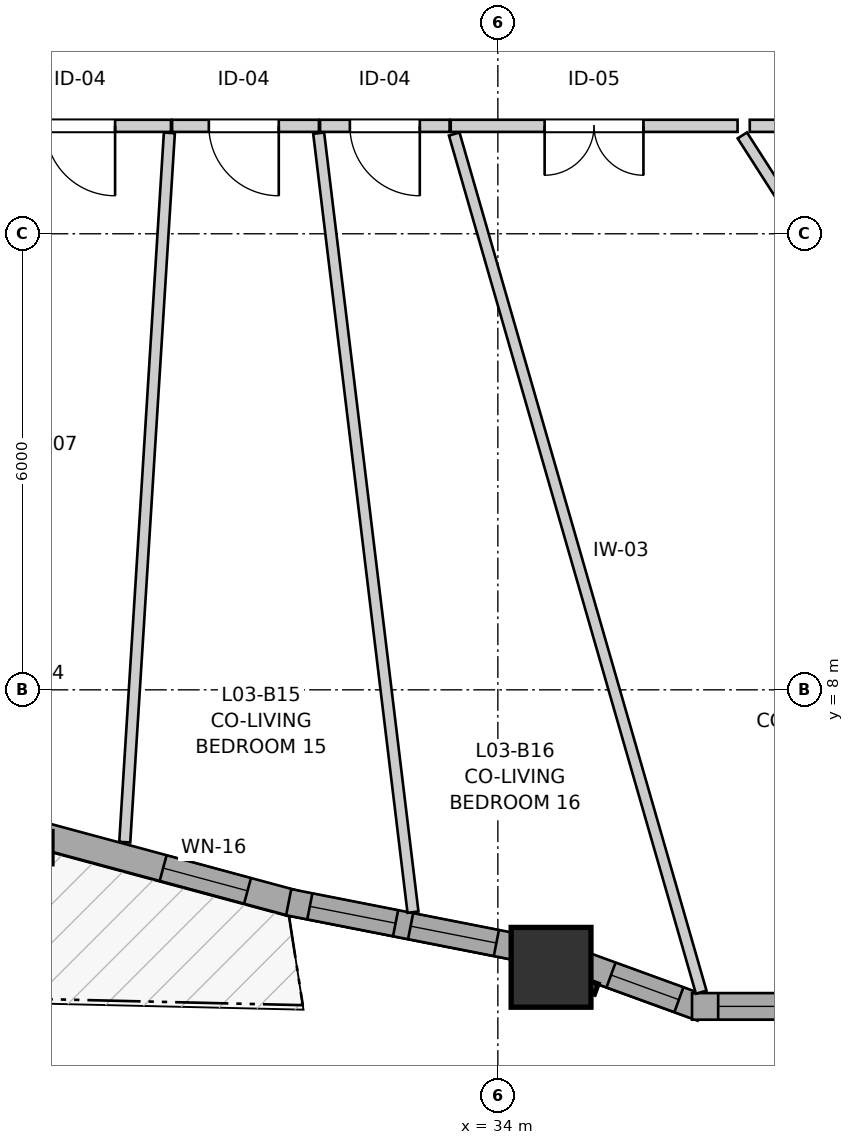
"""IFC4 building model, lengths in metres.
Left out: names, types, materials, properties, quantities, classifications, styles, units other than length and angle.
Written with IfcOpenShell. Run it as: python <this file> out.ifc"""

import sys

from ifc_helpers import new_model, si_unit, direction, frame, frame_2d, origin, origin_2d, place, context, subcontext, project, spatial, rectangle, i_section, extrude, source, transform, mapped, element, fill, save


model = new_model("IFC4")
c1 = context("Model", 3, precision=1e-05, world=origin(), true_north=direction((0.0, 1.0)))
c2 = subcontext(c1, "Body", "Model", "MODEL_VIEW")
j1 = project(units=[si_unit("LENGTHUNIT", "METRE"), si_unit("PLANEANGLEUNIT", "RADIAN")], contexts=[c1])
p1 = place(None, origin())
s1 = spatial("IfcSite", under=j1, at=p1, CompositionType="ELEMENT")
p2 = place(p1, origin())
s2 = spatial("IfcBuilding", under=s1, at=p2, CompositionType="ELEMENT")
p3 = place(p2, frame((0.0, 0.0, 14.2)))
s3 = spatial("IfcBuildingStorey", under=s2, at=p3, CompositionType="ELEMENT", Elevation=14.2)
m1 = source(origin(), c2, "Body", "SweptSolid", [
    extrude(i_section(OverallWidth=0.409, OverallDepth=0.425, WebThickness=0.03, FlangeThickness=0.048, FilletRadius=0.015, at=origin_2d()), origin(), (0.0, 0.0, 1.0), 2.94),
])
p4 = place(p3, frame((27.929, 5.924, 0.0), z_axis=(0.0, 0.0, 1.0), x_axis=(1.0, 0.0, 0.0)))
e1 = element("IfcColumn", 1, at=p4, inside=s3, PredefinedType="PILASTER", context=c2, shape_type="MappedRepresentation", body=[
    mapped(m1, transform((0.0, 0.0, 0.0), x_axis=(1.0, 0.0, 0.0), y_axis=(0.0, 1.0, 0.0), z_axis=(0.0, 0.0, 1.0), scale=1.0)),
])
m2 = source(origin(), c2, "Body", "SweptSolid", [
    extrude(rectangle(XDim=1.05, YDim=1.05, at=origin_2d()), origin(), (0.0, 0.0, 1.0), 2.94),
])
p5 = place(p3, frame((34.7, 4.349, 0.0), z_axis=(0.0, 0.0, 1.0), x_axis=(1.0, 0.0, 0.0)))
e2 = element("IfcColumn", 2, at=p5, inside=s3, PredefinedType="COLUMN", context=c2, shape_type="MappedRepresentation", body=[
    mapped(m2, transform((0.0, 0.0, 0.0), x_axis=(1.0, 0.0, 0.0), y_axis=(0.0, 1.0, 0.0), z_axis=(0.0, 0.0, 1.0), scale=1.0)),
])
p6 = place(p3, frame((27.994, 6.088, 0.0), z_axis=(0.0, 0.0, 1.0), x_axis=(0.965452701472, -0.260578359079, 0.0)))
e3 = element("IfcWall", 3, at=p6, inside=s3, PredefinedType="SOLIDWALL", context=c2, shape_type="SweptSolid", body=[
    extrude(rectangle(XDim=3.459, YDim=0.35, at=frame_2d((1.729, 0.0))), origin(), (0.0, 0.0, 1.0), 2.42),
])
p7 = place(p6, frame((1.66, 0.0, 0.82)))
e4 = element("IfcOpeningElement", 4, at=p7, cuts=e3, PredefinedType="OPENING", context=c2, shape_type="SweptSolid", body=[
    extrude(rectangle(XDim=1.15, YDim=1.2, at=frame_2d((0.575, 0.6))), frame((0.0, 0.185, 0.0), z_axis=(0.0, -1.0, 0.0), x_axis=(1.0, 0.0, 0.0)), (0.0, 0.0, 1.0), 0.37),
])
p8 = place(p3, frame((31.248, 5.206, 0.0), z_axis=(0.0, 0.0, 1.0), x_axis=(0.981233354077, -0.192824025597, 0.0)))
e5 = element("IfcWall", 5, at=p8, inside=s3, PredefinedType="SOLIDWALL", context=c2, shape_type="SweptSolid", body=[
    extrude(rectangle(XDim=3.253, YDim=0.35, at=frame_2d((1.626, 0.0))), origin(), (0.0, 0.0, 1.0), 2.42),
])
p9 = place(p8, frame((0.284, 0.0, 0.82)))
e6 = element("IfcOpeningElement", 6, at=p9, cuts=e5, PredefinedType="OPENING", context=c2, shape_type="SweptSolid", body=[
    extrude(rectangle(XDim=1.15, YDim=1.2, at=frame_2d((0.575, 0.6))), frame((0.0, 0.185, 0.0), z_axis=(0.0, -1.0, 0.0), x_axis=(1.0, 0.0, 0.0)), (0.0, 0.0, 1.0), 0.37),
])
p10 = place(p8, frame((1.635, 0.0, 0.82)))
e7 = element("IfcOpeningElement", 7, at=p10, cuts=e5, PredefinedType="OPENING", context=c2, shape_type="SweptSolid", body=[
    extrude(rectangle(XDim=1.15, YDim=1.2, at=frame_2d((0.575, 0.6))), frame((0.0, 0.185, 0.0), z_axis=(0.0, -1.0, 0.0), x_axis=(1.0, 0.0, 0.0)), (0.0, 0.0, 1.0), 0.37),
])
p11 = place(p3, frame((35.042, 4.411, 0.0), z_axis=(0.0, 0.0, 1.0), x_axis=(0.9396916908, -0.34202269843, 0.0)))
e8 = element("IfcWall", 8, at=p11, inside=s3, PredefinedType="SOLIDWALL", context=c2, shape_type="SweptSolid", body=[
    extrude(rectangle(XDim=1.752, YDim=0.35, at=frame_2d((0.876, 0.0))), origin(), (0.0, 0.0, 1.0), 2.42),
])
p12 = place(p11, frame((0.476, 0.0, 0.82)))
e9 = element("IfcOpeningElement", 9, at=p12, cuts=e8, PredefinedType="OPENING", context=c2, shape_type="SweptSolid", body=[
    extrude(rectangle(XDim=0.95, YDim=1.35, at=frame_2d((0.475, 0.675))), frame((0.0, 0.185, 0.0), z_axis=(0.0, -1.0, 0.0), x_axis=(1.0, 0.0, 0.0)), (0.0, 0.0, 1.0), 0.37),
])
p13 = place(p3, frame((36.555, 3.835, 0.0), z_axis=(0.0, 0.0, 1.0), x_axis=(1.0, 0.0, 0.0)))
e10 = element("IfcWall", 10, at=p13, inside=s3, PredefinedType="SOLIDWALL", context=c2, shape_type="SweptSolid", body=[
    extrude(rectangle(XDim=2.091, YDim=0.35, at=frame_2d((1.045, 0.0))), origin(), (0.0, 0.0, 1.0), 2.42),
])
p14 = place(p13, frame((0.344, 0.0, 0.82)))
e11 = element("IfcOpeningElement", 11, at=p14, cuts=e10, PredefinedType="OPENING", context=c2, shape_type="SweptSolid", body=[
    extrude(rectangle(XDim=1.45, YDim=1.25, at=frame_2d((0.725, 0.625))), frame((0.0, 0.185, 0.0), z_axis=(0.0, -1.0, 0.0), x_axis=(1.0, 0.0, 0.0)), (0.0, 0.0, 1.0), 0.37),
])
p15 = place(p3, frame((37.154, 15.42, 0.0), z_axis=(0.0, 0.0, 1.0), x_axis=(-1.0, 0.0, 0.0)))
e12 = element("IfcWall", 12, at=p15, inside=s3, PredefinedType="PARTITIONING", context=c2, shape_type="SweptSolid", body=[
    extrude(rectangle(XDim=3.774, YDim=0.16, at=frame_2d((1.887, 0.0))), origin(), (0.0, 0.0, 1.0), 2.94),
])
p16 = place(p15, frame((1.239, 0.0, 0.0)))
e13 = element("IfcOpeningElement", 13, at=p16, cuts=e12, PredefinedType="OPENING", context=c2, shape_type="SweptSolid", body=[
    extrude(rectangle(XDim=1.3, YDim=2.1, at=frame_2d((0.65, 1.05))), frame((0.0, 0.09, 0.0), z_axis=(0.0, -1.0, 0.0), x_axis=(1.0, 0.0, 0.0)), (0.0, 0.0, 1.0), 0.18),
])
p17 = place(p3, frame((29.699, 15.42, 0.0), z_axis=(0.0, 0.0, 1.0), x_axis=(-1.0, 0.0, 0.0)))
e14 = element("IfcWall", 14, at=p17, inside=s3, PredefinedType="PARTITIONING", context=c2, shape_type="SweptSolid", body=[
    extrude(rectangle(XDim=2.344, YDim=0.16, at=frame_2d((1.172, 0.0))), origin(), (0.0, 0.0, 1.0), 2.94),
])
p18 = place(p17, frame((0.735, 0.0, 0.0)))
e15 = element("IfcOpeningElement", 15, at=p18, cuts=e14, PredefinedType="OPENING", context=c2, shape_type="SweptSolid", body=[
    extrude(rectangle(XDim=0.92, YDim=2.1, at=frame_2d((0.46, 1.05))), frame((0.0, 0.09, 0.0), z_axis=(0.0, -1.0, 0.0), x_axis=(1.0, 0.0, 0.0)), (0.0, 0.0, 1.0), 0.18),
])
p19 = place(p3, frame((31.646, 15.42, 0.0), z_axis=(0.0, 0.0, 1.0), x_axis=(-1.0, 0.0, 0.0)))
e16 = element("IfcWall", 16, at=p19, inside=s3, PredefinedType="PARTITIONING", context=c2, shape_type="SweptSolid", body=[
    extrude(rectangle(XDim=1.932, YDim=0.16, at=frame_2d((0.966, 0.0))), origin(), (0.0, 0.0, 1.0), 2.94),
])
p20 = place(p19, frame((0.529, 0.0, 0.0)))
e17 = element("IfcOpeningElement", 17, at=p20, cuts=e16, PredefinedType="OPENING", context=c2, shape_type="SweptSolid", body=[
    extrude(rectangle(XDim=0.92, YDim=2.1, at=frame_2d((0.46, 1.05))), frame((0.0, 0.09, 0.0), z_axis=(0.0, -1.0, 0.0), x_axis=(1.0, 0.0, 0.0)), (0.0, 0.0, 1.0), 0.18),
])
p21 = place(p3, frame((33.365, 15.42, 0.0), z_axis=(0.0, 0.0, 1.0), x_axis=(-1.0, 0.0, 0.0)))
e18 = element("IfcWall", 18, at=p21, inside=s3, PredefinedType="PARTITIONING", context=c2, shape_type="SweptSolid", body=[
    extrude(rectangle(XDim=1.704, YDim=0.16, at=frame_2d((0.852, 0.0))), origin(), (0.0, 0.0, 1.0), 2.94),
])
p22 = place(p21, frame((0.392, 0.0, 0.0)))
e19 = element("IfcOpeningElement", 19, at=p22, cuts=e18, PredefinedType="OPENING", context=c2, shape_type="SweptSolid", body=[
    extrude(rectangle(XDim=0.92, YDim=2.1, at=frame_2d((0.46, 1.05))), frame((0.0, 0.09, 0.0), z_axis=(0.0, -1.0, 0.0), x_axis=(1.0, 0.0, 0.0)), (0.0, 0.0, 1.0), 0.18),
])
p23 = place(p3, frame((33.426, 15.312, 0.0), z_axis=(0.0, 0.0, 1.0), x_axis=(0.276606114731, -0.960983380342, 0.0)))
e20 = element("IfcWall", 20, at=p23, inside=s3, PredefinedType="PARTITIONING", context=c2, shape_type="SweptSolid", body=[
    extrude(rectangle(XDim=11.749, YDim=0.145, at=frame_2d((5.875, 0.0))), origin(), (0.0, 0.0, 1.0), 2.94),
])
p24 = place(p3, frame((31.643, 15.323, 0.0), z_axis=(0.0, 0.0, 1.0), x_axis=(0.120185874717, -0.992751406707, 0.0)))
e21 = element("IfcWall", 21, at=p24, inside=s3, PredefinedType="PARTITIONING", context=c2, shape_type="SweptSolid", body=[
    extrude(rectangle(XDim=10.323, YDim=0.145, at=frame_2d((5.162, 0.0))), origin(), (0.0, 0.0, 1.0), 2.94),
])
p25 = place(p3, frame((29.091, 5.996, 0.0), z_axis=(0.0, 0.0, 1.0), x_axis=(0.062797687125, 0.998026277456, 0.0)))
e22 = element("IfcWall", 22, at=p25, inside=s3, PredefinedType="PARTITIONING", context=c2, shape_type="SweptSolid", body=[
    extrude(rectangle(XDim=9.35, YDim=0.145, at=frame_2d((4.675, 0.0))), origin(), (0.0, 0.0, 1.0), 2.94),
])
p26 = place(p3, frame((37.217, 15.294, 0.0), z_axis=(0.0, 0.0, 1.0), x_axis=(0.539878709929, -0.841742822105, 0.0)))
e23 = element("IfcWall", 23, at=p26, inside=s3, PredefinedType="PARTITIONING", context=c2, shape_type="SweptSolid", body=[
    extrude(rectangle(XDim=3.694, YDim=0.145, at=frame_2d((1.847, 0.0))), origin(), (0.0, 0.0, 1.0), 2.94),
])
p27 = place(p3, frame((37.314, 15.42, 0.0), z_axis=(0.0, 0.0, 1.0), x_axis=(1.0, 0.0, 0.0)))
e24 = element("IfcWall", 24, at=p27, inside=s3, PredefinedType="PARTITIONING", context=c2, shape_type="SweptSolid", body=[
    extrude(rectangle(XDim=1.278, YDim=0.16, at=frame_2d((0.639, 0.0))), origin(), (0.0, 0.0, 1.0), 2.94),
])
m3 = source(origin(), c2, "Body", "SweptSolid", [
    extrude(rectangle(XDim=1.15, YDim=1.2, at=frame_2d((0.575, 0.6))), frame((0.0, 0.03, 0.0), z_axis=(0.0, -1.0, 0.0), x_axis=(1.0, 0.0, 0.0)), (0.0, 0.0, 1.0), 0.06),
])
p28 = place(p7, origin())
e25 = element("IfcWindow", 25, at=p28, inside=s3, PartitioningType="SINGLE_PANEL", PredefinedType="WINDOW", context=c2, shape_type="MappedRepresentation", body=[
    mapped(m3, transform((0.0, 0.0, 0.0), x_axis=(1.0, 0.0, 0.0), y_axis=(0.0, 1.0, 0.0), z_axis=(0.0, 0.0, 1.0), scale=1.0)),
])
fill(e4, e25)
p29 = place(p9, origin())
e26 = element("IfcWindow", 26, at=p29, inside=s3, PartitioningType="SINGLE_PANEL", PredefinedType="WINDOW", context=c2, shape_type="MappedRepresentation", body=[
    mapped(m3, transform((0.0, 0.0, 0.0), x_axis=(1.0, 0.0, 0.0), y_axis=(0.0, 1.0, 0.0), z_axis=(0.0, 0.0, 1.0), scale=1.0)),
])
fill(e6, e26)
p30 = place(p10, origin())
e27 = element("IfcWindow", 27, at=p30, inside=s3, PartitioningType="SINGLE_PANEL", PredefinedType="WINDOW", context=c2, shape_type="MappedRepresentation", body=[
    mapped(m3, transform((0.0, 0.0, 0.0), x_axis=(1.0, 0.0, 0.0), y_axis=(0.0, 1.0, 0.0), z_axis=(0.0, 0.0, 1.0), scale=1.0)),
])
fill(e7, e27)
m4 = source(origin(), c2, "Body", "SweptSolid", [
    extrude(rectangle(XDim=0.95, YDim=1.35, at=frame_2d((0.475, 0.675))), frame((0.0, 0.03, 0.0), z_axis=(0.0, -1.0, 0.0), x_axis=(1.0, 0.0, 0.0)), (0.0, 0.0, 1.0), 0.06),
])
p31 = place(p12, origin())
e28 = element("IfcWindow", 28, at=p31, inside=s3, PartitioningType="SINGLE_PANEL", PredefinedType="WINDOW", context=c2, shape_type="MappedRepresentation", body=[
    mapped(m4, transform((0.0, 0.0, 0.0), x_axis=(1.0, 0.0, 0.0), y_axis=(0.0, 1.0, 0.0), z_axis=(0.0, 0.0, 1.0), scale=1.0)),
])
fill(e9, e28)
m5 = source(origin(), c2, "Body", "SweptSolid", [
    extrude(rectangle(XDim=1.45, YDim=1.25, at=frame_2d((0.725, 0.625))), frame((0.0, 0.03, 0.0), z_axis=(0.0, -1.0, 0.0), x_axis=(1.0, 0.0, 0.0)), (0.0, 0.0, 1.0), 0.06),
])
p32 = place(p14, origin())
e29 = element("IfcWindow", 29, at=p32, inside=s3, PartitioningType="SINGLE_PANEL", PredefinedType="WINDOW", context=c2, shape_type="MappedRepresentation", body=[
    mapped(m5, transform((0.0, 0.0, 0.0), x_axis=(1.0, 0.0, 0.0), y_axis=(0.0, 1.0, 0.0), z_axis=(0.0, 0.0, 1.0), scale=1.0)),
])
fill(e11, e29)
m6 = source(origin(), c2, "Body", "SweptSolid", [
    extrude(rectangle(XDim=1.3, YDim=2.1, at=frame_2d((0.65, 1.05))), frame((0.0, 0.025, 0.0), z_axis=(0.0, -1.0, 0.0), x_axis=(1.0, 0.0, 0.0)), (0.0, 0.0, 1.0), 0.05),
])
p33 = place(p16, origin())
e30 = element("IfcDoor", 30, at=p33, inside=s3, OperationType="DOUBLE_DOOR_SINGLE_SWING", PredefinedType="DOOR", context=c2, shape_type="MappedRepresentation", body=[
    mapped(m6, transform((0.0, 0.0, 0.0), x_axis=(1.0, 0.0, 0.0), y_axis=(0.0, 1.0, 0.0), z_axis=(0.0, 0.0, 1.0), scale=1.0)),
])
fill(e13, e30)
m7 = source(origin(), c2, "Body", "SweptSolid", [
    extrude(rectangle(XDim=0.92, YDim=2.1, at=frame_2d((0.46, 1.05))), frame((0.0, 0.025, 0.0), z_axis=(0.0, -1.0, 0.0), x_axis=(1.0, 0.0, 0.0)), (0.0, 0.0, 1.0), 0.05),
])
p34 = place(p18, origin())
e31 = element("IfcDoor", 31, at=p34, inside=s3, OperationType="SINGLE_SWING_LEFT", PredefinedType="DOOR", context=c2, shape_type="MappedRepresentation", body=[
    mapped(m7, transform((0.0, 0.0, 0.0), x_axis=(1.0, 0.0, 0.0), y_axis=(0.0, 1.0, 0.0), z_axis=(0.0, 0.0, 1.0), scale=1.0)),
])
fill(e15, e31)
p35 = place(p20, origin())
e32 = element("IfcDoor", 32, at=p35, inside=s3, OperationType="SINGLE_SWING_LEFT", PredefinedType="DOOR", context=c2, shape_type="MappedRepresentation", body=[
    mapped(m7, transform((0.0, 0.0, 0.0), x_axis=(1.0, 0.0, 0.0), y_axis=(0.0, 1.0, 0.0), z_axis=(0.0, 0.0, 1.0), scale=1.0)),
])
fill(e17, e32)
p36 = place(p22, origin())
e33 = element("IfcDoor", 33, at=p36, inside=s3, OperationType="SINGLE_SWING_LEFT", PredefinedType="DOOR", context=c2, shape_type="MappedRepresentation", body=[
    mapped(m7, transform((0.0, 0.0, 0.0), x_axis=(1.0, 0.0, 0.0), y_axis=(0.0, 1.0, 0.0), z_axis=(0.0, 0.0, 1.0), scale=1.0)),
])
fill(e19, e33)
save(model, sys.argv[1])
